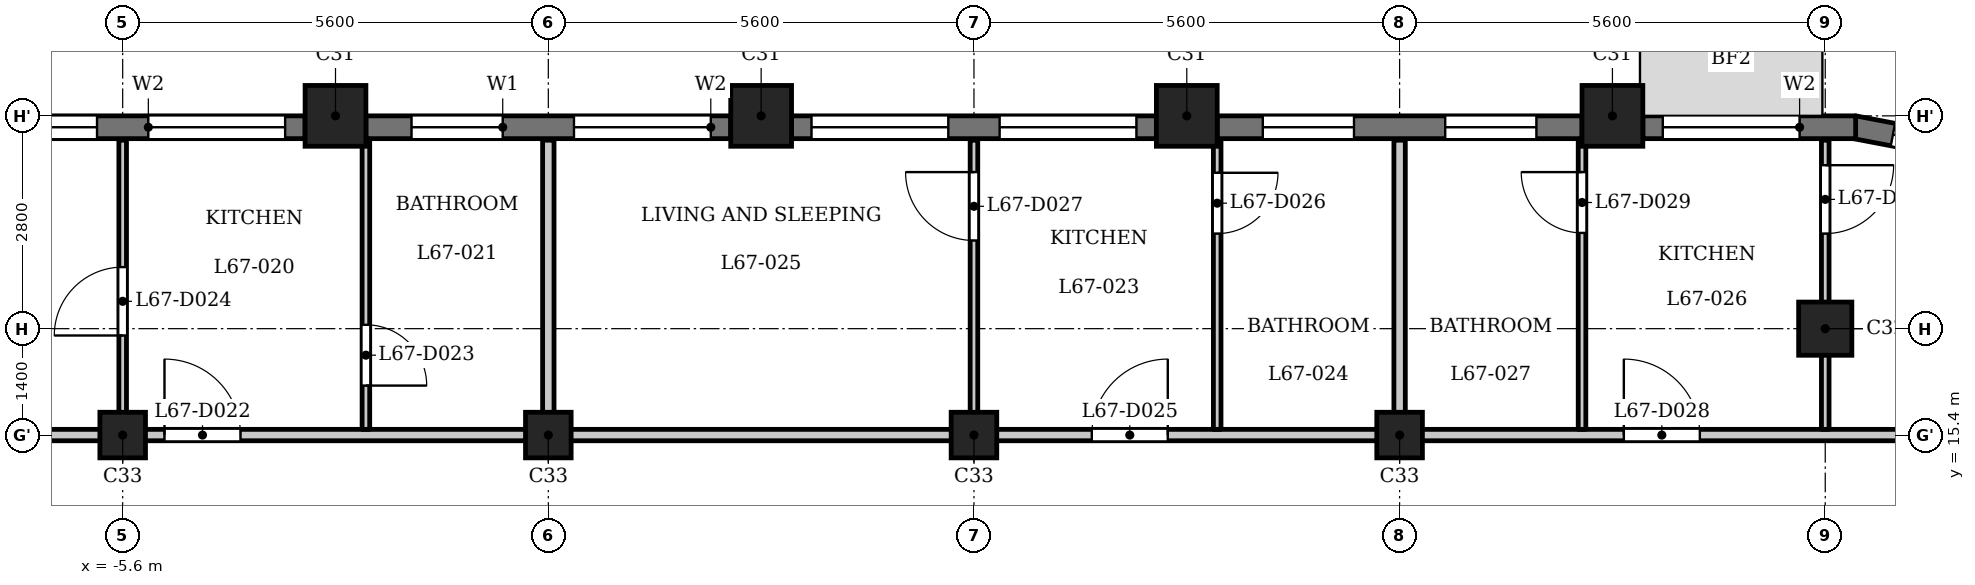
"""IFC4 building model, lengths in metres.
Left out: names, types, materials, properties, quantities, classifications, styles, units other than length and angle.
Written with IfcOpenShell. Run it as: python <this file> out.ifc"""

import sys

from ifc_helpers import new_model, si_unit, direction, frame, frame_2d, origin, origin_2d, place, context, subcontext, project, spatial, rectangle, extrude, element, fill, save


model = new_model("IFC4")
c1 = context("Model", 3, precision=1e-05, world=origin(), true_north=direction((0.0, 1.0)))
c2 = subcontext(c1, "Body", "Model", "MODEL_VIEW")
j1 = project(units=[si_unit("LENGTHUNIT", "METRE"), si_unit("PLANEANGLEUNIT", "RADIAN")], contexts=[c1])
p1 = place(None, origin())
s1 = spatial("IfcSite", under=j1, at=p1, CompositionType="ELEMENT")
p2 = place(p1, origin())
s2 = spatial("IfcBuilding", under=s1, at=p2, CompositionType="ELEMENT")
p3 = place(p2, frame((0.0, 0.0, 259.2)))
s3 = spatial("IfcBuildingStorey", under=s2, at=p3, CompositionType="ELEMENT", Elevation=259.2)
for number, where, z_axis, x_axis in (
    (1, (14.0, 19.6, 0.0), (0.0, 0.0, 1.0), (1.0, 0.0, 0.0)),
    (2, (8.4, 19.6, 0.0), (0.0, 0.0, 1.0), (1.0, 0.0, 0.0)),
    (3, (2.8, 19.6, 0.0), (0.0, 0.0, 1.0), (1.0, 0.0, 0.0)),
    (4, (-2.8, 19.6, 0.0), (0.0, 0.0, 1.0), (1.0, 0.0, 0.0)),
):
    element("IfcColumn", number, at=place(p3, frame(where, z_axis=z_axis, x_axis=x_axis)), inside=s3, PredefinedType="COLUMN", context=c2, shape_type="SweptSolid", body=[
        extrude(rectangle(XDim=0.8, YDim=0.8, at=origin_2d()), origin(), (0.0, 0.0, 1.0), 3.5),
    ])
p4 = place(p3, frame((16.8, 16.8, 0.0), z_axis=(0.0, 0.0, 1.0), x_axis=(1.0, 0.0, 0.0)))
e5 = element("IfcColumn", 5, at=p4, inside=s3, PredefinedType="COLUMN", context=c2, shape_type="SweptSolid", body=[
    extrude(rectangle(XDim=0.7, YDim=0.7, at=origin_2d()), origin(), (0.0, 0.0, 1.0), 3.5),
])
for number, where, z_axis, x_axis in (
    (6, (-5.6, 15.4, 0.0), (0.0, 0.0, 1.0), (1.0, 0.0, 0.0)),
    (7, (0.0, 15.4, 0.0), (0.0, 0.0, 1.0), (1.0, 0.0, 0.0)),
    (8, (5.6, 15.4, 0.0), (0.0, 0.0, 1.0), (1.0, 0.0, 0.0)),
    (9, (11.2, 15.4, 0.0), (0.0, 0.0, 1.0), (1.0, 0.0, 0.0)),
):
    element("IfcColumn", number, at=place(p3, frame(where, z_axis=z_axis, x_axis=x_axis)), inside=s3, PredefinedType="COLUMN", context=c2, shape_type="SweptSolid", body=[
        extrude(rectangle(XDim=0.6, YDim=0.6, at=origin_2d()), origin(), (0.0, 0.0, 1.0), 3.5),
    ])
p5 = place(p3, frame((18.995, 19.105, 0.0), z_axis=(0.0, 0.0, 1.0), x_axis=(-0.982301706131, 0.187305520826, 0.0)))
e10 = element("IfcWall", 10, at=p5, inside=s3, PredefinedType="SOLIDWALL", context=c2, shape_type="SweptSolid", body=[
    extrude(rectangle(XDim=1.856, YDim=0.3, at=frame_2d((0.928, 0.0))), origin(), (0.0, 0.0, 1.0), 2.55),
])
p6 = place(p5, frame((0.528, 0.0, 0.6)))
e11 = element("IfcOpeningElement", 11, at=p6, cuts=e10, PredefinedType="OPENING", context=c2, shape_type="SweptSolid", body=[
    extrude(rectangle(XDim=0.8, YDim=1.55, at=frame_2d((0.4, 0.775))), frame((0.0, 0.16, 0.0), z_axis=(0.0, -1.0, 0.0), x_axis=(1.0, 0.0, 0.0)), (0.0, 0.0, 1.0), 0.32),
])
p7 = place(p3, frame((17.2, 19.45, 0.0), z_axis=(0.0, 0.0, 1.0), x_axis=(-1.0, 0.0, 0.0)))
e12 = element("IfcWall", 12, at=p7, inside=s3, PredefinedType="SOLIDWALL", context=c2, shape_type="SweptSolid", body=[
    extrude(rectangle(XDim=2.8, YDim=0.3, at=frame_2d((1.4, 0.0))), origin(), (0.0, 0.0, 1.0), 2.55),
])
p8 = place(p7, frame((0.738, 0.0, 0.9)))
e13 = element("IfcOpeningElement", 13, at=p8, cuts=e12, PredefinedType="OPENING", context=c2, shape_type="SweptSolid", body=[
    extrude(rectangle(XDim=1.8, YDim=1.25, at=frame_2d((0.9, 0.625))), frame((0.0, 0.16, 0.0), z_axis=(0.0, -1.0, 0.0), x_axis=(1.0, 0.0, 0.0)), (0.0, 0.0, 1.0), 0.32),
])
p9 = place(p3, frame((13.6, 19.45, 0.0), z_axis=(0.0, 0.0, 1.0), x_axis=(-1.0, 0.0, 0.0)))
e14 = element("IfcWall", 14, at=p9, inside=s3, PredefinedType="SOLIDWALL", context=c2, shape_type="SweptSolid", body=[
    extrude(rectangle(XDim=4.8, YDim=0.3, at=frame_2d((2.4, 0.0))), origin(), (0.0, 0.0, 1.0), 2.55),
])
p10 = place(p9, frame((0.6, 0.0, 0.6)))
e15 = element("IfcOpeningElement", 15, at=p10, cuts=e14, PredefinedType="OPENING", context=c2, shape_type="SweptSolid", body=[
    extrude(rectangle(XDim=1.2, YDim=1.55, at=frame_2d((0.6, 0.775))), frame((0.0, 0.16, 0.0), z_axis=(0.0, -1.0, 0.0), x_axis=(1.0, 0.0, 0.0)), (0.0, 0.0, 1.0), 0.32),
])
p11 = place(p9, frame((3.0, 0.0, 0.6)))
e16 = element("IfcOpeningElement", 16, at=p11, cuts=e14, PredefinedType="OPENING", context=c2, shape_type="SweptSolid", body=[
    extrude(rectangle(XDim=1.2, YDim=1.55, at=frame_2d((0.6, 0.775))), frame((0.0, 0.16, 0.0), z_axis=(0.0, -1.0, 0.0), x_axis=(1.0, 0.0, 0.0)), (0.0, 0.0, 1.0), 0.32),
])
p12 = place(p3, frame((8.0, 19.45, 0.0), z_axis=(0.0, 0.0, 1.0), x_axis=(-1.0, 0.0, 0.0)))
e17 = element("IfcWall", 17, at=p12, inside=s3, PredefinedType="SOLIDWALL", context=c2, shape_type="SweptSolid", body=[
    extrude(rectangle(XDim=4.8, YDim=0.3, at=frame_2d((2.4, 0.0))), origin(), (0.0, 0.0, 1.0), 2.55),
])
p13 = place(p12, frame((0.262, 0.0, 0.9)))
e18 = element("IfcOpeningElement", 18, at=p13, cuts=e17, PredefinedType="OPENING", context=c2, shape_type="SweptSolid", body=[
    extrude(rectangle(XDim=1.8, YDim=1.25, at=frame_2d((0.9, 0.625))), frame((0.0, 0.16, 0.0), z_axis=(0.0, -1.0, 0.0), x_axis=(1.0, 0.0, 0.0)), (0.0, 0.0, 1.0), 0.32),
])
p14 = place(p12, frame((2.738, 0.0, 0.9)))
e19 = element("IfcOpeningElement", 19, at=p14, cuts=e17, PredefinedType="OPENING", context=c2, shape_type="SweptSolid", body=[
    extrude(rectangle(XDim=1.8, YDim=1.25, at=frame_2d((0.9, 0.625))), frame((0.0, 0.16, 0.0), z_axis=(0.0, -1.0, 0.0), x_axis=(1.0, 0.0, 0.0)), (0.0, 0.0, 1.0), 0.32),
])
p15 = place(p3, frame((2.4, 19.45, 0.0), z_axis=(0.0, 0.0, 1.0), x_axis=(-1.0, 0.0, 0.0)))
e20 = element("IfcWall", 20, at=p15, inside=s3, PredefinedType="SOLIDWALL", context=c2, shape_type="SweptSolid", body=[
    extrude(rectangle(XDim=4.8, YDim=0.3, at=frame_2d((2.4, 0.0))), origin(), (0.0, 0.0, 1.0), 2.55),
])
p16 = place(p15, frame((0.262, 0.0, 0.9)))
e21 = element("IfcOpeningElement", 21, at=p16, cuts=e20, PredefinedType="OPENING", context=c2, shape_type="SweptSolid", body=[
    extrude(rectangle(XDim=1.8, YDim=1.25, at=frame_2d((0.9, 0.625))), frame((0.0, 0.16, 0.0), z_axis=(0.0, -1.0, 0.0), x_axis=(1.0, 0.0, 0.0)), (0.0, 0.0, 1.0), 0.32),
])
p17 = place(p15, frame((3.0, 0.0, 0.6)))
e22 = element("IfcOpeningElement", 22, at=p17, cuts=e20, PredefinedType="OPENING", context=c2, shape_type="SweptSolid", body=[
    extrude(rectangle(XDim=1.2, YDim=1.55, at=frame_2d((0.6, 0.775))), frame((0.0, 0.16, 0.0), z_axis=(0.0, -1.0, 0.0), x_axis=(1.0, 0.0, 0.0)), (0.0, 0.0, 1.0), 0.32),
])
p18 = place(p3, frame((-3.2, 19.45, 0.0), z_axis=(0.0, 0.0, 1.0), x_axis=(-1.0, 0.0, 0.0)))
e23 = element("IfcWall", 23, at=p18, inside=s3, PredefinedType="SOLIDWALL", context=c2, shape_type="SweptSolid", body=[
    extrude(rectangle(XDim=4.8, YDim=0.3, at=frame_2d((2.4, 0.0))), origin(), (0.0, 0.0, 1.0), 2.55),
])
p19 = place(p18, frame((0.262, 0.0, 0.9)))
e24 = element("IfcOpeningElement", 24, at=p19, cuts=e23, PredefinedType="OPENING", context=c2, shape_type="SweptSolid", body=[
    extrude(rectangle(XDim=1.8, YDim=1.25, at=frame_2d((0.9, 0.625))), frame((0.0, 0.16, 0.0), z_axis=(0.0, -1.0, 0.0), x_axis=(1.0, 0.0, 0.0)), (0.0, 0.0, 1.0), 0.32),
])
p20 = place(p18, frame((2.738, 0.0, 0.9)))
e25 = element("IfcOpeningElement", 25, at=p20, cuts=e23, PredefinedType="OPENING", context=c2, shape_type="SweptSolid", body=[
    extrude(rectangle(XDim=1.8, YDim=1.25, at=frame_2d((0.9, 0.625))), frame((0.0, 0.16, 0.0), z_axis=(0.0, -1.0, 0.0), x_axis=(1.0, 0.0, 0.0)), (0.0, 0.0, 1.0), 0.32),
])
p21 = place(p3, frame((-23.55, 15.4, 0.0), z_axis=(0.0, 0.0, 1.0), x_axis=(1.0, 0.0, 0.0)))
e26 = element("IfcWall", 26, at=p21, inside=s3, PredefinedType="PARTITIONING", context=c2, shape_type="SweptSolid", body=[
    extrude(rectangle(XDim=46.872, YDim=0.15, at=frame_2d((23.436, 0.0))), origin(), (0.0, 0.0, 1.0), 3.2),
])
p22 = place(p21, frame((8.05, 0.0, 0.0)))
e27 = element("IfcOpeningElement", 27, at=p22, cuts=e26, PredefinedType="OPENING", context=c2, shape_type="SweptSolid", body=[
    extrude(rectangle(XDim=1.0, YDim=2.1, at=frame_2d((0.5, 1.05))), frame((0.0, 0.085, 0.0), z_axis=(0.0, -1.0, 0.0), x_axis=(1.0, 0.0, 0.0)), (0.0, 0.0, 1.0), 0.17),
])
p23 = place(p21, frame((18.5, 0.0, 0.0)))
e28 = element("IfcOpeningElement", 28, at=p23, cuts=e26, PredefinedType="OPENING", context=c2, shape_type="SweptSolid", body=[
    extrude(rectangle(XDim=1.0, YDim=2.1, at=frame_2d((0.5, 1.05))), frame((0.0, 0.085, 0.0), z_axis=(0.0, -1.0, 0.0), x_axis=(1.0, 0.0, 0.0)), (0.0, 0.0, 1.0), 0.17),
])
p24 = place(p21, frame((30.7, 0.0, 0.0)))
e29 = element("IfcOpeningElement", 29, at=p24, cuts=e26, PredefinedType="OPENING", context=c2, shape_type="SweptSolid", body=[
    extrude(rectangle(XDim=1.0, YDim=2.1, at=frame_2d((0.5, 1.05))), frame((0.0, 0.085, 0.0), z_axis=(0.0, -1.0, 0.0), x_axis=(1.0, 0.0, 0.0)), (0.0, 0.0, 1.0), 0.17),
])
p25 = place(p21, frame((37.7, 0.0, 0.0)))
e30 = element("IfcOpeningElement", 30, at=p25, cuts=e26, PredefinedType="OPENING", context=c2, shape_type="SweptSolid", body=[
    extrude(rectangle(XDim=1.0, YDim=2.1, at=frame_2d((0.5, 1.05))), frame((0.0, 0.085, 0.0), z_axis=(0.0, -1.0, 0.0), x_axis=(1.0, 0.0, 0.0)), (0.0, 0.0, 1.0), 0.17),
])
p26 = place(p3, frame((-5.6, 15.475, 0.0), z_axis=(0.0, 0.0, 1.0), x_axis=(0.0, 1.0, 0.0)))
e31 = element("IfcWall", 31, at=p26, inside=s3, PredefinedType="PARTITIONING", context=c2, shape_type="SweptSolid", body=[
    extrude(rectangle(XDim=3.805, YDim=0.1, at=frame_2d((1.902, 0.0))), origin(), (0.0, 0.0, 1.0), 3.2),
])
p27 = place(p26, frame((1.235, 0.0, 0.0)))
e32 = element("IfcOpeningElement", 32, at=p27, cuts=e31, PredefinedType="OPENING", context=c2, shape_type="SweptSolid", body=[
    extrude(rectangle(XDim=0.9, YDim=2.1, at=frame_2d((0.45, 1.05))), frame((0.0, 0.06, 0.0), z_axis=(0.0, -1.0, 0.0), x_axis=(1.0, 0.0, 0.0)), (0.0, 0.0, 1.0), 0.12),
])
p28 = place(p3, frame((-2.4, 15.475, 0.0), z_axis=(0.0, 0.0, 1.0), x_axis=(0.0, 1.0, 0.0)))
e33 = element("IfcWall", 33, at=p28, inside=s3, PredefinedType="PARTITIONING", context=c2, shape_type="SweptSolid", body=[
    extrude(rectangle(XDim=3.805, YDim=0.1, at=frame_2d((1.902, 0.0))), origin(), (0.0, 0.0, 1.0), 3.2),
])
p29 = place(p28, frame((0.576, 0.0, 0.0)))
e34 = element("IfcOpeningElement", 34, at=p29, cuts=e33, PredefinedType="OPENING", context=c2, shape_type="SweptSolid", body=[
    extrude(rectangle(XDim=0.8, YDim=2.1, at=frame_2d((0.4, 1.05))), frame((0.0, 0.06, 0.0), z_axis=(0.0, -1.0, 0.0), x_axis=(1.0, 0.0, 0.0)), (0.0, 0.0, 1.0), 0.12),
])
p30 = place(p3, frame((0.0, 15.475, 0.0), z_axis=(0.0, 0.0, 1.0), x_axis=(0.0, 1.0, 0.0)))
e35 = element("IfcWall", 35, at=p30, inside=s3, PredefinedType="PARTITIONING", context=c2, shape_type="SweptSolid", body=[
    extrude(rectangle(XDim=3.805, YDim=0.15, at=frame_2d((1.902, 0.0))), origin(), (0.0, 0.0, 1.0), 3.2),
])
p31 = place(p3, frame((5.6, 15.475, 0.0), z_axis=(0.0, 0.0, 1.0), x_axis=(0.0, 1.0, 0.0)))
e36 = element("IfcWall", 36, at=p31, inside=s3, PredefinedType="PARTITIONING", context=c2, shape_type="SweptSolid", body=[
    extrude(rectangle(XDim=3.805, YDim=0.1, at=frame_2d((1.902, 0.0))), origin(), (0.0, 0.0, 1.0), 3.2),
])
p32 = place(p31, frame((2.485, 0.0, 0.0)))
e37 = element("IfcOpeningElement", 37, at=p32, cuts=e36, PredefinedType="OPENING", context=c2, shape_type="SweptSolid", body=[
    extrude(rectangle(XDim=0.9, YDim=2.1, at=frame_2d((0.45, 1.05))), frame((0.0, 0.06, 0.0), z_axis=(0.0, -1.0, 0.0), x_axis=(1.0, 0.0, 0.0)), (0.0, 0.0, 1.0), 0.12),
])
p33 = place(p3, frame((8.8, 15.475, 0.0), z_axis=(0.0, 0.0, 1.0), x_axis=(0.0, 1.0, 0.0)))
e38 = element("IfcWall", 38, at=p33, inside=s3, PredefinedType="PARTITIONING", context=c2, shape_type="SweptSolid", body=[
    extrude(rectangle(XDim=3.805, YDim=0.1, at=frame_2d((1.902, 0.0))), origin(), (0.0, 0.0, 1.0), 3.2),
])
p34 = place(p33, frame((2.576, 0.0, 0.0)))
e39 = element("IfcOpeningElement", 39, at=p34, cuts=e38, PredefinedType="OPENING", context=c2, shape_type="SweptSolid", body=[
    extrude(rectangle(XDim=0.8, YDim=2.1, at=frame_2d((0.4, 1.05))), frame((0.0, 0.06, 0.0), z_axis=(0.0, -1.0, 0.0), x_axis=(1.0, 0.0, 0.0)), (0.0, 0.0, 1.0), 0.12),
])
p35 = place(p3, frame((11.2, 15.475, 0.0), z_axis=(0.0, 0.0, 1.0), x_axis=(0.0, 1.0, 0.0)))
e40 = element("IfcWall", 40, at=p35, inside=s3, PredefinedType="PARTITIONING", context=c2, shape_type="SweptSolid", body=[
    extrude(rectangle(XDim=3.805, YDim=0.15, at=frame_2d((1.902, 0.0))), origin(), (0.0, 0.0, 1.0), 3.2),
])
p36 = place(p3, frame((13.6, 15.475, 0.0), z_axis=(0.0, 0.0, 1.0), x_axis=(0.0, 1.0, 0.0)))
e41 = element("IfcWall", 41, at=p36, inside=s3, PredefinedType="PARTITIONING", context=c2, shape_type="SweptSolid", body=[
    extrude(rectangle(XDim=3.805, YDim=0.1, at=frame_2d((1.902, 0.0))), origin(), (0.0, 0.0, 1.0), 3.2),
])
p37 = place(p36, frame((2.585, 0.0, 0.0)))
e42 = element("IfcOpeningElement", 42, at=p37, cuts=e41, PredefinedType="OPENING", context=c2, shape_type="SweptSolid", body=[
    extrude(rectangle(XDim=0.8, YDim=2.1, at=frame_2d((0.4, 1.05))), frame((0.0, 0.06, 0.0), z_axis=(0.0, -1.0, 0.0), x_axis=(1.0, 0.0, 0.0)), (0.0, 0.0, 1.0), 0.12),
])
p38 = place(p3, frame((16.8, 15.475, 0.0), z_axis=(0.0, 0.0, 1.0), x_axis=(0.0, 1.0, 0.0)))
e43 = element("IfcWall", 43, at=p38, inside=s3, PredefinedType="PARTITIONING", context=c2, shape_type="SweptSolid", body=[
    extrude(rectangle(XDim=3.805, YDim=0.1, at=frame_2d((1.902, 0.0))), origin(), (0.0, 0.0, 1.0), 3.2),
])
p39 = place(p38, frame((2.576, 0.0, 0.0)))
e44 = element("IfcOpeningElement", 44, at=p39, cuts=e43, PredefinedType="OPENING", context=c2, shape_type="SweptSolid", body=[
    extrude(rectangle(XDim=0.9, YDim=2.1, at=frame_2d((0.45, 1.05))), frame((0.0, 0.06, 0.0), z_axis=(0.0, -1.0, 0.0), x_axis=(1.0, 0.0, 0.0)), (0.0, 0.0, 1.0), 0.12),
])
p40 = place(p23, origin())
e45 = element("IfcDoor", 45, at=p40, inside=s3, OperationType="SINGLE_SWING_RIGHT", PredefinedType="DOOR", context=c2, shape_type="SweptSolid", body=[
    extrude(rectangle(XDim=1.0, YDim=2.1, at=frame_2d((0.5, 1.05))), frame((0.0, 0.025, 0.0), z_axis=(0.0, -1.0, 0.0), x_axis=(1.0, 0.0, 0.0)), (0.0, 0.0, 1.0), 0.05),
])
fill(e28, e45)
p41 = place(p29, origin())
e46 = element("IfcDoor", 46, at=p41, inside=s3, OperationType="SINGLE_SWING_LEFT", PredefinedType="DOOR", context=c2, shape_type="SweptSolid", body=[
    extrude(rectangle(XDim=0.8, YDim=2.1, at=frame_2d((0.4, 1.05))), frame((0.0, 0.025, 0.0), z_axis=(0.0, -1.0, 0.0), x_axis=(1.0, 0.0, 0.0)), (0.0, 0.0, 1.0), 0.05),
])
fill(e34, e46)
p42 = place(p27, origin())
e47 = element("IfcDoor", 47, at=p42, inside=s3, OperationType="SINGLE_SWING_RIGHT", PredefinedType="DOOR", context=c2, shape_type="SweptSolid", body=[
    extrude(rectangle(XDim=0.9, YDim=2.1, at=frame_2d((0.45, 1.05))), frame((0.0, 0.025, 0.0), z_axis=(0.0, -1.0, 0.0), x_axis=(1.0, 0.0, 0.0)), (0.0, 0.0, 1.0), 0.05),
])
fill(e32, e47)
p43 = place(p24, origin())
e48 = element("IfcDoor", 48, at=p43, inside=s3, OperationType="SINGLE_SWING_LEFT", PredefinedType="DOOR", context=c2, shape_type="SweptSolid", body=[
    extrude(rectangle(XDim=1.0, YDim=2.1, at=frame_2d((0.5, 1.05))), frame((0.0, 0.025, 0.0), z_axis=(0.0, -1.0, 0.0), x_axis=(1.0, 0.0, 0.0)), (0.0, 0.0, 1.0), 0.05),
])
fill(e29, e48)
p44 = place(p34, origin())
e49 = element("IfcDoor", 49, at=p44, inside=s3, OperationType="SINGLE_SWING_RIGHT", PredefinedType="DOOR", context=c2, shape_type="SweptSolid", body=[
    extrude(rectangle(XDim=0.8, YDim=2.1, at=frame_2d((0.4, 1.05))), frame((0.0, 0.025, 0.0), z_axis=(0.0, -1.0, 0.0), x_axis=(1.0, 0.0, 0.0)), (0.0, 0.0, 1.0), 0.05),
])
fill(e39, e49)
p45 = place(p32, origin())
e50 = element("IfcDoor", 50, at=p45, inside=s3, OperationType="SINGLE_SWING_LEFT", PredefinedType="DOOR", context=c2, shape_type="SweptSolid", body=[
    extrude(rectangle(XDim=0.9, YDim=2.1, at=frame_2d((0.45, 1.05))), frame((0.0, 0.025, 0.0), z_axis=(0.0, -1.0, 0.0), x_axis=(1.0, 0.0, 0.0)), (0.0, 0.0, 1.0), 0.05),
])
fill(e37, e50)
p46 = place(p25, origin())
e51 = element("IfcDoor", 51, at=p46, inside=s3, OperationType="SINGLE_SWING_RIGHT", PredefinedType="DOOR", context=c2, shape_type="SweptSolid", body=[
    extrude(rectangle(XDim=1.0, YDim=2.1, at=frame_2d((0.5, 1.05))), frame((0.0, 0.025, 0.0), z_axis=(0.0, -1.0, 0.0), x_axis=(1.0, 0.0, 0.0)), (0.0, 0.0, 1.0), 0.05),
])
fill(e30, e51)
p47 = place(p37, origin())
e52 = element("IfcDoor", 52, at=p47, inside=s3, OperationType="SINGLE_SWING_LEFT", PredefinedType="DOOR", context=c2, shape_type="SweptSolid", body=[
    extrude(rectangle(XDim=0.8, YDim=2.1, at=frame_2d((0.4, 1.05))), frame((0.0, 0.025, 0.0), z_axis=(0.0, -1.0, 0.0), x_axis=(1.0, 0.0, 0.0)), (0.0, 0.0, 1.0), 0.05),
])
fill(e42, e52)
p48 = place(p39, origin())
e53 = element("IfcDoor", 53, at=p48, inside=s3, OperationType="SINGLE_SWING_RIGHT", PredefinedType="DOOR", context=c2, shape_type="SweptSolid", body=[
    extrude(rectangle(XDim=0.9, YDim=2.1, at=frame_2d((0.45, 1.05))), frame((0.0, 0.025, 0.0), z_axis=(0.0, -1.0, 0.0), x_axis=(1.0, 0.0, 0.0)), (0.0, 0.0, 1.0), 0.05),
])
fill(e44, e53)
p49 = place(p6, origin())
e54 = element("IfcWindow", 54, at=p49, inside=s3, PartitioningType="SINGLE_PANEL", PredefinedType="WINDOW", context=c2, shape_type="SweptSolid", body=[
    extrude(rectangle(XDim=0.8, YDim=1.55, at=frame_2d((0.4, 0.775))), frame((0.0, 0.03, 0.0), z_axis=(0.0, -1.0, 0.0), x_axis=(1.0, 0.0, 0.0)), (0.0, 0.0, 1.0), 0.06),
])
fill(e11, e54)
p50 = place(p8, origin())
e55 = element("IfcWindow", 55, at=p50, inside=s3, PartitioningType="SINGLE_PANEL", PredefinedType="WINDOW", context=c2, shape_type="SweptSolid", body=[
    extrude(rectangle(XDim=1.8, YDim=1.25, at=frame_2d((0.9, 0.625))), frame((0.0, 0.03, 0.0), z_axis=(0.0, -1.0, 0.0), x_axis=(1.0, 0.0, 0.0)), (0.0, 0.0, 1.0), 0.06),
])
fill(e13, e55)
p51 = place(p10, origin())
e56 = element("IfcWindow", 56, at=p51, inside=s3, PartitioningType="SINGLE_PANEL", PredefinedType="WINDOW", context=c2, shape_type="SweptSolid", body=[
    extrude(rectangle(XDim=1.2, YDim=1.55, at=frame_2d((0.6, 0.775))), frame((0.0, 0.03, 0.0), z_axis=(0.0, -1.0, 0.0), x_axis=(1.0, 0.0, 0.0)), (0.0, 0.0, 1.0), 0.06),
])
fill(e15, e56)
p52 = place(p11, origin())
e57 = element("IfcWindow", 57, at=p52, inside=s3, PartitioningType="SINGLE_PANEL", PredefinedType="WINDOW", context=c2, shape_type="SweptSolid", body=[
    extrude(rectangle(XDim=1.2, YDim=1.55, at=frame_2d((0.6, 0.775))), frame((0.0, 0.03, 0.0), z_axis=(0.0, -1.0, 0.0), x_axis=(1.0, 0.0, 0.0)), (0.0, 0.0, 1.0), 0.06),
])
fill(e16, e57)
p53 = place(p13, origin())
e58 = element("IfcWindow", 58, at=p53, inside=s3, PartitioningType="SINGLE_PANEL", PredefinedType="WINDOW", context=c2, shape_type="SweptSolid", body=[
    extrude(rectangle(XDim=1.8, YDim=1.25, at=frame_2d((0.9, 0.625))), frame((0.0, 0.03, 0.0), z_axis=(0.0, -1.0, 0.0), x_axis=(1.0, 0.0, 0.0)), (0.0, 0.0, 1.0), 0.06),
])
fill(e18, e58)
p54 = place(p14, origin())
e59 = element("IfcWindow", 59, at=p54, inside=s3, PartitioningType="SINGLE_PANEL", PredefinedType="WINDOW", context=c2, shape_type="SweptSolid", body=[
    extrude(rectangle(XDim=1.8, YDim=1.25, at=frame_2d((0.9, 0.625))), frame((0.0, 0.03, 0.0), z_axis=(0.0, -1.0, 0.0), x_axis=(1.0, 0.0, 0.0)), (0.0, 0.0, 1.0), 0.06),
])
fill(e19, e59)
p55 = place(p16, origin())
e60 = element("IfcWindow", 60, at=p55, inside=s3, PartitioningType="SINGLE_PANEL", PredefinedType="WINDOW", context=c2, shape_type="SweptSolid", body=[
    extrude(rectangle(XDim=1.8, YDim=1.25, at=frame_2d((0.9, 0.625))), frame((0.0, 0.03, 0.0), z_axis=(0.0, -1.0, 0.0), x_axis=(1.0, 0.0, 0.0)), (0.0, 0.0, 1.0), 0.06),
])
fill(e21, e60)
p56 = place(p17, origin())
e61 = element("IfcWindow", 61, at=p56, inside=s3, PartitioningType="SINGLE_PANEL", PredefinedType="WINDOW", context=c2, shape_type="SweptSolid", body=[
    extrude(rectangle(XDim=1.2, YDim=1.55, at=frame_2d((0.6, 0.775))), frame((0.0, 0.03, 0.0), z_axis=(0.0, -1.0, 0.0), x_axis=(1.0, 0.0, 0.0)), (0.0, 0.0, 1.0), 0.06),
])
fill(e22, e61)
p57 = place(p19, origin())
e62 = element("IfcWindow", 62, at=p57, inside=s3, PartitioningType="SINGLE_PANEL", PredefinedType="WINDOW", context=c2, shape_type="SweptSolid", body=[
    extrude(rectangle(XDim=1.8, YDim=1.25, at=frame_2d((0.9, 0.625))), frame((0.0, 0.03, 0.0), z_axis=(0.0, -1.0, 0.0), x_axis=(1.0, 0.0, 0.0)), (0.0, 0.0, 1.0), 0.06),
])
fill(e24, e62)
p58 = place(p20, origin())
e63 = element("IfcWindow", 63, at=p58, inside=s3, PartitioningType="SINGLE_PANEL", PredefinedType="WINDOW", context=c2, shape_type="SweptSolid", body=[
    extrude(rectangle(XDim=1.8, YDim=1.25, at=frame_2d((0.9, 0.625))), frame((0.0, 0.03, 0.0), z_axis=(0.0, -1.0, 0.0), x_axis=(1.0, 0.0, 0.0)), (0.0, 0.0, 1.0), 0.06),
])
fill(e25, e63)
save(model, sys.argv[1])
